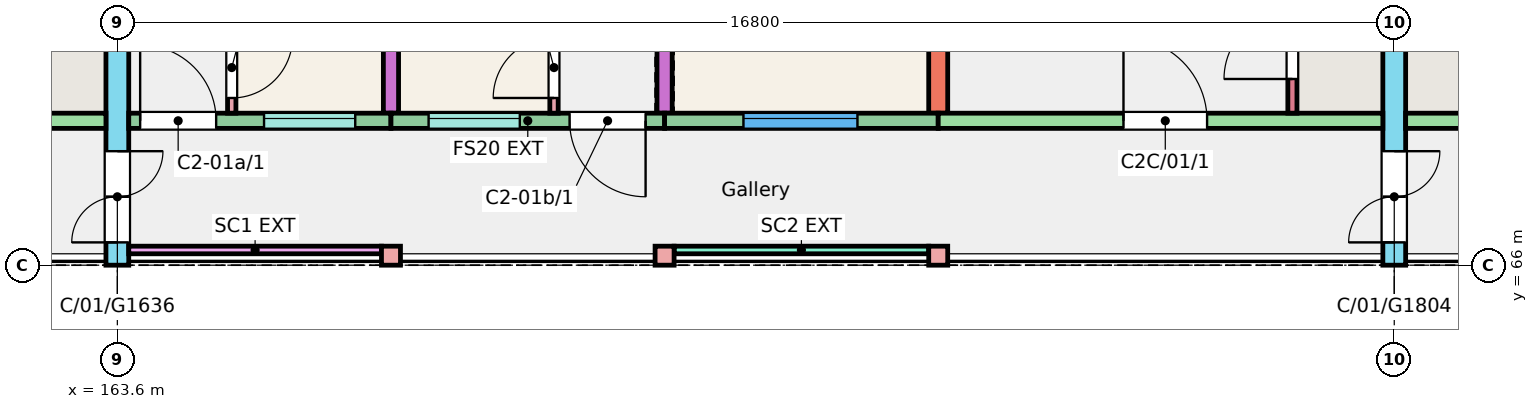
"""IFC4 building model, lengths in metres.
Left out: names, types, materials, properties, quantities, classifications, styles, units other than length and angle.
Written with IfcOpenShell. Run it as: python <this file> out.ifc"""

import sys

from ifc_helpers import new_model, si_unit, direction, frame, frame_2d, origin, origin_2d, place, context, subcontext, project, spatial, rectangle, extrude, element, fill, save


model = new_model("IFC4")
c1 = context("Model", 3, precision=1e-05, world=origin(), true_north=direction((0.0, 1.0)))
c2 = subcontext(c1, "Body", "Model", "MODEL_VIEW")
j1 = project(units=[si_unit("LENGTHUNIT", "METRE"), si_unit("PLANEANGLEUNIT", "RADIAN")], contexts=[c1])
p1 = place(None, origin())
s1 = spatial("IfcSite", under=j1, at=p1, CompositionType="ELEMENT")
p2 = place(p1, origin())
s2 = spatial("IfcBuilding", under=s1, at=p2, CompositionType="ELEMENT")
p3 = place(p2, frame((0.0, 0.0, 3.0)))
s3 = spatial("IfcBuildingStorey", under=s2, at=p3, CompositionType="ELEMENT", Elevation=3.0)
p4 = place(p3, frame((163.6, 66.0, 0.0), z_axis=(0.0, 0.0, 1.0), x_axis=(0.0, 1.0, 0.0)))
e1 = element("IfcWall", 1, at=p4, inside=s3, PredefinedType="SHEAR", context=c2, shape_type="SweptSolid", body=[
    extrude(rectangle(XDim=11.0, YDim=0.3, at=frame_2d((5.5, 0.0))), origin(), (0.0, 0.0, 1.0), 3.0),
])
p5 = place(p4, frame((0.3, 0.0, 0.0)))
e2 = element("IfcOpeningElement", 2, at=p5, cuts=e1, PredefinedType="OPENING", context=c2, shape_type="SweptSolid", body=[
    extrude(rectangle(XDim=1.2, YDim=2.1, at=frame_2d((0.6, 1.05))), frame((0.0, 0.16, 0.0), z_axis=(0.0, -1.0, 0.0), x_axis=(1.0, 0.0, 0.0)), (0.0, 0.0, 1.0), 0.32),
])
p6 = place(p3, frame((167.2, 68.0, 0.0), z_axis=(0.0, 0.0, 1.0), x_axis=(0.0, 1.0, 0.0)))
e3 = element("IfcWall", 3, at=p6, inside=s3, PredefinedType="SHEAR", context=c2, shape_type="SweptSolid", body=[
    extrude(rectangle(XDim=9.0, YDim=0.2, at=frame_2d((4.5, 0.0))), origin(), (0.0, 0.0, 1.0), 3.0),
])
p7 = place(p3, frame((170.8, 68.0, 0.0), z_axis=(0.0, 0.0, 1.0), x_axis=(0.0, 1.0, 0.0)))
e4 = element("IfcWall", 4, at=p7, inside=s3, PredefinedType="SHEAR", context=c2, shape_type="SweptSolid", body=[
    extrude(rectangle(XDim=9.0, YDim=0.2, at=frame_2d((4.5, 0.0))), origin(), (0.0, 0.0, 1.0), 3.0),
])
p8 = place(p7, frame((2.4, 0.0, 0.0)))
e5 = element("IfcOpeningElement", 5, at=p8, cuts=e4, PredefinedType="OPENING", context=c2, shape_type="SweptSolid", body=[
    extrude(rectangle(XDim=1.2, YDim=2.1, at=frame_2d((0.6, 1.05))), frame((0.0, 0.11, 0.0), z_axis=(0.0, -1.0, 0.0), x_axis=(1.0, 0.0, 0.0)), (0.0, 0.0, 1.0), 0.22),
])
p9 = place(p7, frame((6.4, 0.0, 0.0)))
e6 = element("IfcOpeningElement", 6, at=p9, cuts=e4, PredefinedType="OPENING", context=c2, shape_type="SweptSolid", body=[
    extrude(rectangle(XDim=1.2, YDim=2.1, at=frame_2d((0.6, 1.05))), frame((0.0, 0.11, 0.0), z_axis=(0.0, -1.0, 0.0), x_axis=(1.0, 0.0, 0.0)), (0.0, 0.0, 1.0), 0.22),
])
p10 = place(p3, frame((174.4, 68.0, 0.0), z_axis=(0.0, 0.0, 1.0), x_axis=(0.0, 1.0, 0.0)))
e7 = element("IfcWall", 7, at=p10, inside=s3, PredefinedType="SHEAR", context=c2, shape_type="SweptSolid", body=[
    extrude(rectangle(XDim=9.0, YDim=0.25, at=frame_2d((4.5, 0.0))), origin(), (0.0, 0.0, 1.0), 3.0),
])
p11 = place(p3, frame((180.4, 66.0, 0.0), z_axis=(0.0, 0.0, 1.0), x_axis=(0.0, 1.0, 0.0)))
e8 = element("IfcWall", 8, at=p11, inside=s3, PredefinedType="SHEAR", context=c2, shape_type="SweptSolid", body=[
    extrude(rectangle(XDim=11.0, YDim=0.3, at=frame_2d((5.5, 0.0))), origin(), (0.0, 0.0, 1.0), 3.0),
])
p12 = place(p11, frame((0.3, 0.0, 0.0)))
e9 = element("IfcOpeningElement", 9, at=p12, cuts=e8, PredefinedType="OPENING", context=c2, shape_type="SweptSolid", body=[
    extrude(rectangle(XDim=1.2, YDim=2.1, at=frame_2d((0.6, 1.05))), frame((0.0, 0.16, 0.0), z_axis=(0.0, -1.0, 0.0), x_axis=(1.0, 0.0, 0.0)), (0.0, 0.0, 1.0), 0.32),
])
p13 = place(p3, frame((157.6, 67.9, 0.0), z_axis=(0.0, 0.0, 1.0), x_axis=(1.0, 0.0, 0.0)))
e10 = element("IfcWall", 10, at=p13, inside=s3, PredefinedType="SHEAR", context=c2, shape_type="SweptSolid", body=[
    extrude(rectangle(XDim=5.85, YDim=0.2, at=frame_2d((2.925, 0.0))), origin(), (0.0, 0.0, 1.0), 3.0),
])
p14 = place(p13, frame((2.438, 0.0, 0.0)))
e11 = element("IfcOpeningElement", 11, at=p14, cuts=e10, PredefinedType="OPENING", context=c2, shape_type="SweptSolid", body=[
    extrude(rectangle(XDim=1.1, YDim=2.1, at=frame_2d((0.55, 1.05))), frame((0.0, 0.11, 0.0), z_axis=(0.0, -1.0, 0.0), x_axis=(1.0, 0.0, 0.0)), (0.0, 0.0, 1.0), 0.22),
])
p15 = place(p3, frame((163.75, 67.9, 0.0), z_axis=(0.0, 0.0, 1.0), x_axis=(1.0, 0.0, 0.0)))
e12 = element("IfcWall", 12, at=p15, inside=s3, PredefinedType="SOLIDWALL", context=c2, shape_type="SweptSolid", body=[
    extrude(rectangle(XDim=3.45, YDim=0.2, at=frame_2d((1.725, 0.0))), origin(), (0.0, 0.0, 1.0), 3.0),
])
p16 = place(p15, frame((1.78, 0.0, 1.1)))
e13 = element("IfcOpeningElement", 13, at=p16, cuts=e12, PredefinedType="OPENING", context=c2, shape_type="SweptSolid", body=[
    extrude(rectangle(XDim=1.2, YDim=1.3, at=frame_2d((0.6, 0.65))), frame((0.0, 0.11, 0.0), z_axis=(0.0, -1.0, 0.0), x_axis=(1.0, 0.0, 0.0)), (0.0, 0.0, 1.0), 0.22),
])
p17 = place(p15, frame((0.15, 0.0, 0.0)))
e14 = element("IfcOpeningElement", 14, at=p17, cuts=e12, PredefinedType="OPENING", context=c2, shape_type="SweptSolid", body=[
    extrude(rectangle(XDim=1.0, YDim=2.1, at=frame_2d((0.5, 1.05))), frame((0.0, 0.11, 0.0), z_axis=(0.0, -1.0, 0.0), x_axis=(1.0, 0.0, 0.0)), (0.0, 0.0, 1.0), 0.22),
])
p18 = place(p3, frame((167.2, 67.9, 0.0), z_axis=(0.0, 0.0, 1.0), x_axis=(1.0, 0.0, 0.0)))
e15 = element("IfcWall", 15, at=p18, inside=s3, PredefinedType="SOLIDWALL", context=c2, shape_type="SweptSolid", body=[
    extrude(rectangle(XDim=3.6, YDim=0.2, at=frame_2d((1.8, 0.0))), origin(), (0.0, 0.0, 1.0), 3.0),
])
p19 = place(p18, frame((0.495, 0.0, 1.1)))
e16 = element("IfcOpeningElement", 16, at=p19, cuts=e15, PredefinedType="OPENING", context=c2, shape_type="SweptSolid", body=[
    extrude(rectangle(XDim=1.2, YDim=1.3, at=frame_2d((0.6, 0.65))), frame((0.0, 0.11, 0.0), z_axis=(0.0, -1.0, 0.0), x_axis=(1.0, 0.0, 0.0)), (0.0, 0.0, 1.0), 0.22),
])
p20 = place(p18, frame((2.35, 0.0, 0.0)))
e17 = element("IfcOpeningElement", 17, at=p20, cuts=e15, PredefinedType="OPENING", context=c2, shape_type="SweptSolid", body=[
    extrude(rectangle(XDim=1.0, YDim=2.1, at=frame_2d((0.5, 1.05))), frame((0.0, 0.11, 0.0), z_axis=(0.0, -1.0, 0.0), x_axis=(1.0, 0.0, 0.0)), (0.0, 0.0, 1.0), 0.22),
])
p21 = place(p3, frame((170.8, 67.9, 0.0), z_axis=(0.0, 0.0, 1.0), x_axis=(1.0, 0.0, 0.0)))
e18 = element("IfcWall", 18, at=p21, inside=s3, PredefinedType="SOLIDWALL", context=c2, shape_type="SweptSolid", body=[
    extrude(rectangle(XDim=3.6, YDim=0.2, at=frame_2d((1.8, 0.0))), origin(), (0.0, 0.0, 1.0), 3.0),
])
p22 = place(p21, frame((1.038, 0.0, 0.9)))
e19 = element("IfcOpeningElement", 19, at=p22, cuts=e18, PredefinedType="OPENING", context=c2, shape_type="SweptSolid", body=[
    extrude(rectangle(XDim=1.5, YDim=1.5, at=frame_2d((0.75, 0.75))), frame((0.0, 0.11, 0.0), z_axis=(0.0, -1.0, 0.0), x_axis=(1.0, 0.0, 0.0)), (0.0, 0.0, 1.0), 0.22),
])
p23 = place(p3, frame((174.4, 67.9, 0.0), z_axis=(0.0, 0.0, 1.0), x_axis=(1.0, 0.0, 0.0)))
e20 = element("IfcWall", 20, at=p23, inside=s3, PredefinedType="SHEAR", context=c2, shape_type="SweptSolid", body=[
    extrude(rectangle(XDim=5.85, YDim=0.2, at=frame_2d((2.925, 0.0))), origin(), (0.0, 0.0, 1.0), 3.0),
])
p24 = place(p23, frame((2.438, 0.0, 0.0)))
e21 = element("IfcOpeningElement", 21, at=p24, cuts=e20, PredefinedType="OPENING", context=c2, shape_type="SweptSolid", body=[
    extrude(rectangle(XDim=1.1, YDim=2.1, at=frame_2d((0.55, 1.05))), frame((0.0, 0.11, 0.0), z_axis=(0.0, -1.0, 0.0), x_axis=(1.0, 0.0, 0.0)), (0.0, 0.0, 1.0), 0.22),
])
p25 = place(p3, frame((179.06, 68.0, 0.0), z_axis=(0.0, 0.0, 1.0), x_axis=(0.0, 1.0, 0.0)))
e22 = element("IfcWall", 22, at=p25, inside=s3, PredefinedType="SHEAR", context=c2, shape_type="SweptSolid", body=[
    extrude(rectangle(XDim=1.72, YDim=0.12, at=frame_2d((0.86, 0.0))), origin(), (0.0, 0.0, 1.0), 3.0),
])
p26 = place(p25, frame((0.45, 0.0, 0.0)))
e23 = element("IfcOpeningElement", 23, at=p26, cuts=e22, PredefinedType="OPENING", context=c2, shape_type="SweptSolid", body=[
    extrude(rectangle(XDim=0.9, YDim=2.1, at=frame_2d((0.45, 1.05))), frame((0.0, 0.07, 0.0), z_axis=(0.0, -1.0, 0.0), x_axis=(1.0, 0.0, 0.0)), (0.0, 0.0, 1.0), 0.14),
])
p27 = place(p3, frame((180.55, 67.9, 0.0), z_axis=(0.0, 0.0, 1.0), x_axis=(1.0, 0.0, 0.0)))
e24 = element("IfcWall", 24, at=p27, inside=s3, PredefinedType="SHEAR", context=c2, shape_type="SweptSolid", body=[
    extrude(rectangle(XDim=5.85, YDim=0.2, at=frame_2d((2.925, 0.0))), origin(), (0.0, 0.0, 1.0), 3.0),
])
p28 = place(p27, frame((2.312, 0.0, 0.0)))
e25 = element("IfcOpeningElement", 25, at=p28, cuts=e24, PredefinedType="OPENING", context=c2, shape_type="SweptSolid", body=[
    extrude(rectangle(XDim=1.1, YDim=2.1, at=frame_2d((0.55, 1.05))), frame((0.0, 0.11, 0.0), z_axis=(0.0, -1.0, 0.0), x_axis=(1.0, 0.0, 0.0)), (0.0, 0.0, 1.0), 0.22),
])
for number, where, z_axis, x_axis in (
    (26, (167.2, 66.125, 0.0), (0.0, 0.0, 1.0), (1.0, 0.0, 0.0)),
    (27, (170.8, 66.125, 0.0), (0.0, 0.0, 1.0), (1.0, 0.0, 0.0)),
    (28, (174.4, 66.125, 0.0), (0.0, 0.0, 1.0), (1.0, 0.0, 0.0)),
):
    element("IfcColumn", number, at=place(p3, frame(where, z_axis=z_axis, x_axis=x_axis)), inside=s3, PredefinedType="COLUMN", context=c2, shape_type="SweptSolid", body=[
        extrude(rectangle(XDim=0.25, YDim=0.25, at=origin_2d()), origin(), (0.0, 0.0, 1.0), 3.0),
    ])
p29 = place(p3, frame((163.75, 66.2, 0.0), z_axis=(0.0, 0.0, 1.0), x_axis=(1.0, 0.0, 0.0)))
e29 = element("IfcWall", 29, at=p29, inside=s3, PredefinedType="SOLIDWALL", context=c2, shape_type="SweptSolid", body=[
    extrude(rectangle(XDim=3.325, YDim=0.1, at=frame_2d((1.663, 0.0))), origin(), (0.0, 0.0, 1.0), 2.45),
])
p30 = place(p3, frame((170.925, 66.2, 0.0), z_axis=(0.0, 0.0, 1.0), x_axis=(1.0, 0.0, 0.0)))
e30 = element("IfcWall", 30, at=p30, inside=s3, PredefinedType="SOLIDWALL", context=c2, shape_type="SweptSolid", body=[
    extrude(rectangle(XDim=3.35, YDim=0.1, at=frame_2d((1.675, 0.0))), origin(), (0.0, 0.0, 1.0), 2.45),
])
p31 = place(p3, frame((165.105, 68.0, 0.0), z_axis=(0.0, 0.0, 1.0), x_axis=(0.0, 1.0, 0.0)))
e31 = element("IfcWall", 31, at=p31, inside=s3, PredefinedType="PARTITIONING", context=c2, shape_type="SweptSolid", body=[
    extrude(rectangle(XDim=4.7, YDim=0.11, at=frame_2d((2.35, 0.0))), origin(), (0.0, 0.0, 1.0), 2.8),
])
p32 = place(p31, frame((0.2, 0.0, 0.0)))
e32 = element("IfcOpeningElement", 32, at=p32, cuts=e31, PredefinedType="OPENING", context=c2, shape_type="SweptSolid", body=[
    extrude(rectangle(XDim=0.8, YDim=2.1, at=frame_2d((0.4, 1.05))), frame((0.0, 0.065, 0.0), z_axis=(0.0, -1.0, 0.0), x_axis=(1.0, 0.0, 0.0)), (0.0, 0.0, 1.0), 0.13),
])
p33 = place(p31, frame((3.75, 0.0, 0.0)))
e33 = element("IfcOpeningElement", 33, at=p33, cuts=e31, PredefinedType="OPENING", context=c2, shape_type="SweptSolid", body=[
    extrude(rectangle(XDim=0.8, YDim=2.1, at=frame_2d((0.4, 1.05))), frame((0.0, 0.065, 0.0), z_axis=(0.0, -1.0, 0.0), x_axis=(1.0, 0.0, 0.0)), (0.0, 0.0, 1.0), 0.13),
])
p34 = place(p3, frame((169.345, 68.0, 0.0), z_axis=(0.0, 0.0, 1.0), x_axis=(0.0, 1.0, 0.0)))
e34 = element("IfcWall", 34, at=p34, inside=s3, PredefinedType="PARTITIONING", context=c2, shape_type="SweptSolid", body=[
    extrude(rectangle(XDim=4.3, YDim=0.11, at=frame_2d((2.15, 0.0))), origin(), (0.0, 0.0, 1.0), 2.8),
])
p35 = place(p34, frame((0.2, 0.0, 0.0)))
e35 = element("IfcOpeningElement", 35, at=p35, cuts=e34, PredefinedType="OPENING", context=c2, shape_type="SweptSolid", body=[
    extrude(rectangle(XDim=0.8, YDim=2.1, at=frame_2d((0.4, 1.05))), frame((0.0, 0.065, 0.0), z_axis=(0.0, -1.0, 0.0), x_axis=(1.0, 0.0, 0.0)), (0.0, 0.0, 1.0), 0.13),
])
p36 = place(p34, frame((3.35, 0.0, 0.0)))
e36 = element("IfcOpeningElement", 36, at=p36, cuts=e34, PredefinedType="OPENING", context=c2, shape_type="SweptSolid", body=[
    extrude(rectangle(XDim=0.8, YDim=2.1, at=frame_2d((0.4, 1.05))), frame((0.0, 0.065, 0.0), z_axis=(0.0, -1.0, 0.0), x_axis=(1.0, 0.0, 0.0)), (0.0, 0.0, 1.0), 0.13),
])
p37 = place(p16, origin())
e37 = element("IfcWindow", 37, at=p37, inside=s3, PartitioningType="SINGLE_PANEL", PredefinedType="WINDOW", context=c2, shape_type="SweptSolid", body=[
    extrude(rectangle(XDim=1.2, YDim=1.3, at=frame_2d((0.6, 0.65))), frame((0.0, 0.06, 0.0), z_axis=(0.0, -1.0, 0.0), x_axis=(1.0, 0.0, 0.0)), (0.0, 0.0, 1.0), 0.06),
])
fill(e13, e37)
p38 = place(p22, origin())
e38 = element("IfcWindow", 38, at=p38, inside=s3, PartitioningType="SINGLE_PANEL", PredefinedType="WINDOW", context=c2, shape_type="SweptSolid", body=[
    extrude(rectangle(XDim=1.5, YDim=1.5, at=frame_2d((0.75, 0.75))), frame((0.0, 0.06, 0.0), z_axis=(0.0, -1.0, 0.0), x_axis=(1.0, 0.0, 0.0)), (0.0, 0.0, 1.0), 0.06),
])
fill(e19, e38)
p39 = place(p19, origin())
e39 = element("IfcWindow", 39, at=p39, inside=s3, PartitioningType="SINGLE_PANEL", PredefinedType="WINDOW", context=c2, shape_type="SweptSolid", body=[
    extrude(rectangle(XDim=1.2, YDim=1.3, at=frame_2d((0.6, 0.65))), frame((0.0, 0.06, 0.0), z_axis=(0.0, -1.0, 0.0), x_axis=(1.0, 0.0, 0.0)), (0.0, 0.0, 1.0), 0.06),
])
fill(e16, e39)
p40 = place(p17, origin())
e40 = element("IfcDoor", 40, at=p40, inside=s3, OperationType="SINGLE_SWING_LEFT", PredefinedType="DOOR", context=c2, shape_type="SweptSolid", body=[
    extrude(rectangle(XDim=1.0, YDim=2.1, at=frame_2d((0.5, 1.05))), frame((0.0, 0.025, 0.0), z_axis=(0.0, -1.0, 0.0), x_axis=(1.0, 0.0, 0.0)), (0.0, 0.0, 1.0), 0.05),
])
fill(e14, e40)
p41 = place(p32, origin())
e41 = element("IfcDoor", 41, at=p41, inside=s3, OperationType="SINGLE_SWING_RIGHT", PredefinedType="DOOR", context=c2, shape_type="SweptSolid", body=[
    extrude(rectangle(XDim=0.8, YDim=2.1, at=frame_2d((0.4, 1.05))), frame((0.0, 0.025, 0.0), z_axis=(0.0, -1.0, 0.0), x_axis=(1.0, 0.0, 0.0)), (0.0, 0.0, 1.0), 0.05),
])
fill(e32, e41)
p42 = place(p20, origin())
e42 = element("IfcDoor", 42, at=p42, inside=s3, OperationType="SINGLE_SWING_RIGHT", PredefinedType="DOOR", context=c2, shape_type="SweptSolid", body=[
    extrude(rectangle(XDim=1.0, YDim=2.1, at=frame_2d((0.5, 1.05))), frame((0.0, 0.025, 0.0), z_axis=(0.0, -1.0, 0.0), x_axis=(1.0, 0.0, 0.0)), (0.0, 0.0, 1.0), 0.05),
])
fill(e17, e42)
p43 = place(p35, origin())
e43 = element("IfcDoor", 43, at=p43, inside=s3, OperationType="SINGLE_SWING_LEFT", PredefinedType="DOOR", context=c2, shape_type="SweptSolid", body=[
    extrude(rectangle(XDim=0.8, YDim=2.1, at=frame_2d((0.4, 1.05))), frame((0.0, 0.025, 0.0), z_axis=(0.0, -1.0, 0.0), x_axis=(1.0, 0.0, 0.0)), (0.0, 0.0, 1.0), 0.05),
])
fill(e35, e43)
p44 = place(p24, origin())
e44 = element("IfcDoor", 44, at=p44, inside=s3, OperationType="SINGLE_SWING_LEFT", PredefinedType="DOOR", context=c2, shape_type="SweptSolid", body=[
    extrude(rectangle(XDim=1.1, YDim=2.1, at=frame_2d((0.55, 1.05))), frame((0.0, 0.025, 0.0), z_axis=(0.0, -1.0, 0.0), x_axis=(1.0, 0.0, 0.0)), (0.0, 0.0, 1.0), 0.05),
])
fill(e21, e44)
p45 = place(p26, origin())
e45 = element("IfcDoor", 45, at=p45, inside=s3, OperationType="SINGLE_SWING_LEFT", PredefinedType="DOOR", context=c2, shape_type="SweptSolid", body=[
    extrude(rectangle(XDim=0.9, YDim=2.1, at=frame_2d((0.45, 1.05))), frame((0.0, 0.025, 0.0), z_axis=(0.0, -1.0, 0.0), x_axis=(1.0, 0.0, 0.0)), (0.0, 0.0, 1.0), 0.05),
])
fill(e23, e45)
p46 = place(p5, origin())
e46 = element("IfcDoor", 46, at=p46, inside=s3, OperationType="DOUBLE_DOOR_SINGLE_SWING", PredefinedType="DOOR", context=c2, shape_type="SweptSolid", body=[
    extrude(rectangle(XDim=1.2, YDim=2.1, at=frame_2d((0.6, 1.05))), frame((0.0, 0.025, 0.0), z_axis=(0.0, -1.0, 0.0), x_axis=(1.0, 0.0, 0.0)), (0.0, 0.0, 1.0), 0.05),
])
fill(e2, e46)
p47 = place(p12, origin())
e47 = element("IfcDoor", 47, at=p47, inside=s3, OperationType="DOUBLE_DOOR_SINGLE_SWING", PredefinedType="DOOR", context=c2, shape_type="SweptSolid", body=[
    extrude(rectangle(XDim=1.2, YDim=2.1, at=frame_2d((0.6, 1.05))), frame((0.0, 0.025, 0.0), z_axis=(0.0, -1.0, 0.0), x_axis=(1.0, 0.0, 0.0)), (0.0, 0.0, 1.0), 0.05),
])
fill(e9, e47)
save(model, sys.argv[1])
